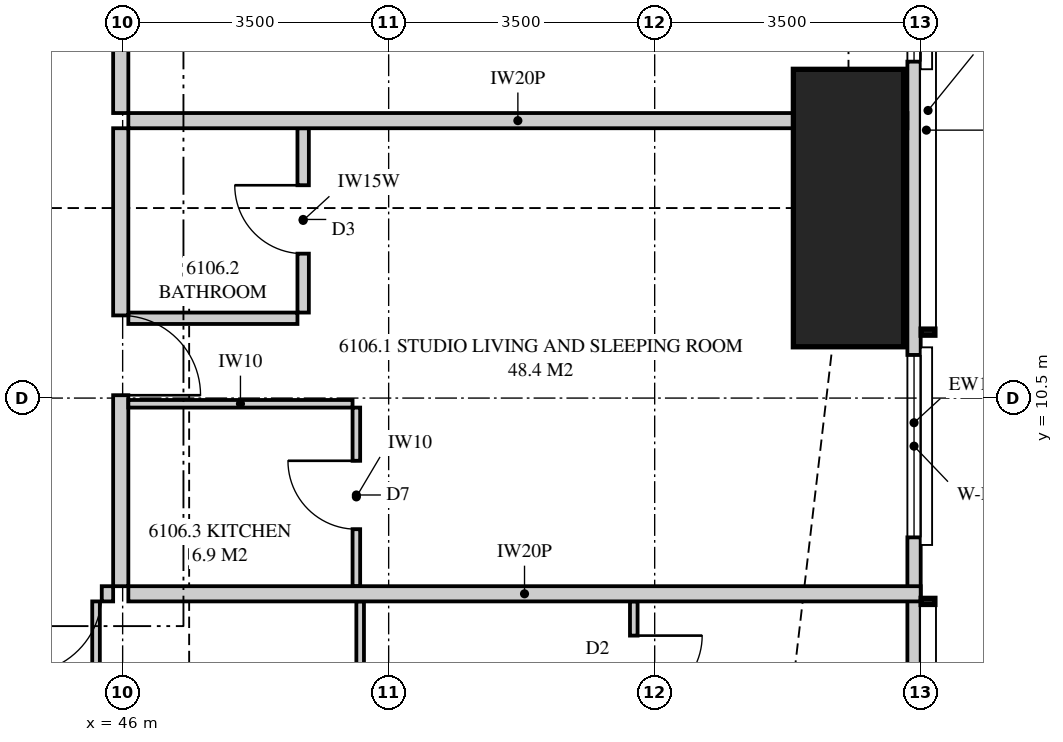
"""IFC4 building model, lengths in metres.
Left out: names, types, materials, properties, quantities, classifications, styles, units other than length and angle.
Written with IfcOpenShell. Run it as: python <this file> out.ifc"""

import sys

from ifc_helpers import new_model, si_unit, direction, frame, frame_2d, origin, origin_2d, place, context, subcontext, project, spatial, polyline, rectangle, outline, extrude, element, fill, save


model = new_model("IFC4")
c1 = context("Model", 3, precision=1e-05, world=origin(), true_north=direction((0.0, 1.0)))
c2 = subcontext(c1, "Body", "Model", "MODEL_VIEW")
j1 = project(units=[si_unit("LENGTHUNIT", "METRE"), si_unit("PLANEANGLEUNIT", "RADIAN")], contexts=[c1])
p1 = place(None, origin())
s1 = spatial("IfcSite", under=j1, at=p1, CompositionType="ELEMENT")
p2 = place(p1, origin())
s2 = spatial("IfcBuilding", under=s1, at=p2, CompositionType="ELEMENT")
p3 = place(p2, frame((0.0, 0.0, 224.95)))
s3 = spatial("IfcBuildingStorey", under=s2, at=p3, CompositionType="ELEMENT", Elevation=224.95)
p4 = place(p3, frame((55.55, 13.0, 0.0), z_axis=(0.0, 0.0, 1.0), x_axis=(1.0, 0.0, 0.0)))
e1 = element("IfcColumn", 1, at=p4, inside=s3, PredefinedType="COLUMN", context=c2, shape_type="SweptSolid", body=[
    extrude(rectangle(XDim=1.45, YDim=3.65, at=origin_2d()), origin(), (0.0, 0.0, 1.0), 3.5),
])
p5 = place(p3, frame((56.413, 3.051, 0.0), z_axis=(0.0, 0.0, 1.0), x_axis=(0.0, 1.0, 0.0)))
e2 = element("IfcWall", 2, at=p5, inside=s3, PredefinedType="SOLIDWALL", context=c2, shape_type="SweptSolid", body=[
    extrude(outline(polyline([(0.0, 0.0), (14.249, 0.0), (14.249, 2.3), (9.949, 2.3), (9.949, 3.26), (9.858, 3.26), (9.858, 2.3), (9.688, 2.3), (9.688, 3.26), (0.0, 3.26), (0.0, 0.0)])), frame((0.0, 0.087, 0.0), z_axis=(0.0, -1.0, 0.0), x_axis=(1.0, 0.0, 0.0)), (0.0, 0.0, 1.0), 0.175),
])
p6 = place(p5, frame((1.487, 0.0, 0.4)))
e3 = element("IfcOpeningElement", 3, at=p6, cuts=e2, PredefinedType="OPENING", context=c2, shape_type="SweptSolid", body=[
    extrude(rectangle(XDim=1.8, YDim=1.85, at=frame_2d((0.9, 0.925))), frame((0.0, 0.097, 0.0), z_axis=(0.0, -1.0, 0.0), x_axis=(1.0, 0.0, 0.0)), (0.0, 0.0, 1.0), 0.195),
])
p7 = place(p5, frame((5.616, 0.0, 0.4)))
e4 = element("IfcOpeningElement", 4, at=p7, cuts=e2, PredefinedType="OPENING", context=c2, shape_type="SweptSolid", body=[
    extrude(rectangle(XDim=2.4, YDim=1.85, at=frame_2d((1.2, 0.925))), frame((0.0, 0.097, 0.0), z_axis=(0.0, -1.0, 0.0), x_axis=(1.0, 0.0, 0.0)), (0.0, 0.0, 1.0), 0.195),
])
p8 = place(p5, frame((11.875, 0.0, 0.4)))
e5 = element("IfcOpeningElement", 5, at=p8, cuts=e2, PredefinedType="OPENING", context=c2, shape_type="SweptSolid", body=[
    extrude(rectangle(XDim=1.8, YDim=1.85, at=frame_2d((0.9, 0.925))), frame((0.0, 0.097, 0.0), z_axis=(0.0, -1.0, 0.0), x_axis=(1.0, 0.0, 0.0)), (0.0, 0.0, 1.0), 0.195),
])
p9 = place(p3, frame((38.55, 7.925, 0.0), z_axis=(0.0, 0.0, 1.0), x_axis=(1.0, 0.0, 0.0)))
e6 = element("IfcWall", 6, at=p9, inside=s3, PredefinedType="PARTITIONING", context=c2, shape_type="SweptSolid", body=[
    extrude(outline(polyline([(0.0, 0.0), (7.325, 0.0), (7.325, 3.26), (7.325, 2.66), (7.015, 2.66), (7.015, 3.26), (0.01, 3.26), (0.01, 2.66), (0.0, 2.66), (0.0, 3.26), (0.0, 0.0)])), frame((0.0, 0.1, 0.0), z_axis=(0.0, -1.0, 0.0), x_axis=(1.0, 0.0, 0.0)), (0.0, 0.0, 1.0), 0.2),
])
p10 = place(p9, frame((6.125, 0.0, 0.0)))
e7 = element("IfcOpeningElement", 7, at=p10, cuts=e6, PredefinedType="OPENING", context=c2, shape_type="SweptSolid", body=[
    extrude(rectangle(XDim=1.05, YDim=2.2, at=frame_2d((0.525, 1.1))), frame((0.0, 0.11, 0.0), z_axis=(0.0, -1.0, 0.0), x_axis=(1.0, 0.0, 0.0)), (0.0, 0.0, 1.0), 0.22),
])
p11 = place(p3, frame((45.65, 0.175, 0.0), z_axis=(0.0, 0.0, 1.0), x_axis=(0.0, 1.0, 0.0)))
e8 = element("IfcWall", 8, at=p11, inside=s3, PredefinedType="PARTITIONING", context=c2, shape_type="SweptSolid", body=[
    extrude(outline(polyline([(0.529, 2.3), (0.0, 2.3), (0.0, 0.0), (0.529, 0.0), (0.529, 0.252), (1.021, 0.252), (1.021, 0.0), (7.65, 0.0), (7.65, 2.66), (1.635, 2.66), (1.635, 2.3), (1.021, 2.3), (1.021, 2.048), (0.529, 2.048), (0.529, 2.3)])), frame((0.0, 0.05, 0.0), z_axis=(0.0, -1.0, 0.0), x_axis=(1.0, 0.0, 0.0)), (0.0, 0.0, 1.0), 0.1),
])
p12 = place(p11, frame((3.8, 0.0, 0.0)))
e9 = element("IfcOpeningElement", 9, at=p12, cuts=e8, PredefinedType="OPENING", context=c2, shape_type="SweptSolid", body=[
    extrude(rectangle(XDim=0.9, YDim=2.1, at=frame_2d((0.45, 1.05))), frame((0.0, 0.06, 0.0), z_axis=(0.0, -1.0, 0.0), x_axis=(1.0, 0.0, 0.0)), (0.0, 0.0, 1.0), 0.12),
])
p13 = place(p3, frame((52.725, 0.175, 0.0), z_axis=(0.0, 0.0, 1.0), x_axis=(0.0, 1.0, 0.0)))
e10 = element("IfcWall", 10, at=p13, inside=s3, PredefinedType="PARTITIONING", context=c2, shape_type="SweptSolid", body=[
    extrude(outline(polyline([(0.0, 0.0), (7.65, 0.0), (7.65, 3.26), (2.639, 3.26), (2.639, 2.3), (0.894, 2.3), (0.894, 3.26), (0.0, 3.26), (0.0, 0.0)])), frame((0.0, 0.05, 0.0), z_axis=(0.0, -1.0, 0.0), x_axis=(1.0, 0.0, 0.0)), (0.0, 0.0, 1.0), 0.1),
])
p14 = place(p13, frame((6.3, 0.0, 0.0)))
e11 = element("IfcOpeningElement", 11, at=p14, cuts=e10, PredefinedType="OPENING", context=c2, shape_type="SweptSolid", body=[
    extrude(rectangle(XDim=0.9, YDim=2.1, at=frame_2d((0.45, 1.05))), frame((0.0, 0.06, 0.0), z_axis=(0.0, -1.0, 0.0), x_axis=(1.0, 0.0, 0.0)), (0.0, 0.0, 1.0), 0.12),
])
p15 = place(p3, frame((49.125, 4.875, 0.0), z_axis=(0.0, 0.0, 1.0), x_axis=(0.0, 1.0, 0.0)))
e12 = element("IfcWall", 12, at=p15, inside=s3, PredefinedType="PARTITIONING", context=c2, shape_type="SweptSolid", body=[
    extrude(rectangle(XDim=2.95, YDim=0.1, at=frame_2d((1.475, 0.0))), origin(), (0.0, 0.0, 1.0), 3.26),
])
p16 = place(p3, frame((46.075, 7.925, 0.0), z_axis=(0.0, 0.0, 1.0), x_axis=(1.0, 0.0, 0.0)))
e13 = element("IfcWall", 13, at=p16, inside=s3, PredefinedType="PARTITIONING", context=c2, shape_type="SweptSolid", body=[
    extrude(outline(polyline([(0.0, 0.0), (10.425, 0.0), (10.425, 3.26), (9.8, 3.26), (9.8, 2.3), (7.968, 2.3), (7.968, 3.26), (2.11, 3.26), (2.11, 2.66), (0.0, 2.66), (0.0, 3.26), (0.0, 0.0)])), frame((0.0, 0.1, 0.0), z_axis=(0.0, -1.0, 0.0), x_axis=(1.0, 0.0, 0.0)), (0.0, 0.0, 1.0), 0.2),
])
p17 = place(p3, frame((56.325, 14.15, 0.0), z_axis=(0.0, 0.0, 1.0), x_axis=(-1.0, 0.0, 0.0)))
e14 = element("IfcWall", 14, at=p17, inside=s3, PredefinedType="PARTITIONING", context=c2, shape_type="SweptSolid", body=[
    extrude(outline(polyline([(0.529, 2.3), (0.0, 2.3), (0.0, 0.0), (0.529, 0.0), (0.529, 0.396), (1.021, 0.396), (1.021, 0.0), (10.25, 0.0), (10.25, 2.66), (1.685, 2.66), (1.685, 2.3), (1.021, 2.3), (1.021, 1.904), (0.529, 1.904), (0.529, 2.3)])), frame((0.0, 0.1, 0.0), z_axis=(0.0, -1.0, 0.0), x_axis=(1.0, 0.0, 0.0)), (0.0, 0.0, 1.0), 0.2),
])
p18 = place(p3, frame((45.975, 8.025, 0.0), z_axis=(0.0, 0.0, 1.0), x_axis=(0.0, 1.0, 0.0)))
e15 = element("IfcWall", 15, at=p18, inside=s3, PredefinedType="PARTITIONING", context=c2, shape_type="SweptSolid", body=[
    extrude(outline(polyline([(0.0, 0.0), (6.025, 0.0), (6.025, 3.26), (6.025, 2.66), (5.085, 2.66), (0.0, 2.66), (0.0, 3.26), (0.0, 0.0)])), frame((0.0, 0.1, 0.0), z_axis=(0.0, -1.0, 0.0), x_axis=(1.0, 0.0, 0.0)), (0.0, 0.0, 1.0), 0.2),
])
p19 = place(p18, frame((2.512, 0.0, 0.0)))
e16 = element("IfcOpeningElement", 16, at=p19, cuts=e15, PredefinedType="OPENING", context=c2, shape_type="SweptSolid", body=[
    extrude(rectangle(XDim=1.05, YDim=2.2, at=frame_2d((0.525, 1.1))), frame((0.0, 0.11, 0.0), z_axis=(0.0, -1.0, 0.0), x_axis=(1.0, 0.0, 0.0)), (0.0, 0.0, 1.0), 0.22),
])
p20 = place(p3, frame((48.375, 11.625, 0.0), z_axis=(0.0, 0.0, 1.0), x_axis=(0.0, 1.0, 0.0)))
e17 = element("IfcWall", 17, at=p20, inside=s3, PredefinedType="PLUMBINGWALL", context=c2, shape_type="SweptSolid", body=[
    extrude(outline(polyline([(0.0, 0.0), (2.425, 0.0), (2.425, 3.26), (2.425, 2.66), (0.09, 2.66), (0.09, 3.26), (0.0, 3.26), (0.0, 0.0)])), frame((0.0, 0.075, 0.0), z_axis=(0.0, -1.0, 0.0), x_axis=(1.0, 0.0, 0.0)), (0.0, 0.0, 1.0), 0.15),
])
p21 = place(p20, frame((0.775, 0.0, 0.0)))
e18 = element("IfcOpeningElement", 18, at=p21, cuts=e17, PredefinedType="OPENING", context=c2, shape_type="SweptSolid", body=[
    extrude(rectangle(XDim=0.9, YDim=2.1, at=frame_2d((0.45, 1.05))), frame((0.0, 0.085, 0.0), z_axis=(0.0, -1.0, 0.0), x_axis=(1.0, 0.0, 0.0)), (0.0, 0.0, 1.0), 0.17),
])
p22 = place(p3, frame((48.3, 11.55, 0.0), z_axis=(0.0, 0.0, 1.0), x_axis=(-1.0, 0.0, 0.0)))
e19 = element("IfcWall", 19, at=p22, inside=s3, PredefinedType="PLUMBINGWALL", context=c2, shape_type="SweptSolid", body=[
    extrude(outline(polyline([(0.0, 0.0), (2.225, 0.0), (2.225, 3.26), (2.225, 2.66), (0.14, 2.66), (0.14, 3.26), (0.0, 3.26), (0.0, 0.0)])), frame((0.0, 0.075, 0.0), z_axis=(0.0, -1.0, 0.0), x_axis=(1.0, 0.0, 0.0)), (0.0, 0.0, 1.0), 0.15),
])
p23 = place(p3, frame((49.075, 8.025, 0.0), z_axis=(0.0, 0.0, 1.0), x_axis=(0.0, 1.0, 0.0)))
e20 = element("IfcWall", 20, at=p23, inside=s3, PredefinedType="PARTITIONING", context=c2, shape_type="SweptSolid", body=[
    extrude(rectangle(XDim=2.35, YDim=0.1, at=frame_2d((1.175, 0.0))), origin(), (0.0, 0.0, 1.0), 3.26),
])
p24 = place(p23, frame((0.75, 0.0, 0.0)))
e21 = element("IfcOpeningElement", 21, at=p24, cuts=e20, PredefinedType="OPENING", context=c2, shape_type="SweptSolid", body=[
    extrude(rectangle(XDim=0.9, YDim=2.1, at=frame_2d((0.45, 1.05))), frame((0.0, 0.06, 0.0), z_axis=(0.0, -1.0, 0.0), x_axis=(1.0, 0.0, 0.0)), (0.0, 0.0, 1.0), 0.12),
])
p25 = place(p3, frame((49.025, 10.425, 0.0), z_axis=(0.0, 0.0, 1.0), x_axis=(-1.0, 0.0, 0.0)))
e22 = element("IfcWall", 22, at=p25, inside=s3, PredefinedType="PARTITIONING", context=c2, shape_type="SweptSolid", body=[
    extrude(outline(polyline([(0.0, 0.0), (2.95, 0.0), (2.95, 3.26), (2.95, 2.66), (0.89, 2.66), (0.89, 3.26), (0.0, 3.26), (0.0, 0.0)])), frame((0.0, 0.05, 0.0), z_axis=(0.0, -1.0, 0.0), x_axis=(1.0, 0.0, 0.0)), (0.0, 0.0, 1.0), 0.1),
])
p26 = place(p3, frame((45.975, 14.25, 0.0), z_axis=(0.0, 0.0, 1.0), x_axis=(0.0, 1.0, 0.0)))
e23 = element("IfcWall", 23, at=p26, inside=s3, PredefinedType="PARTITIONING", context=c2, shape_type="SweptSolid", body=[
    extrude(outline(polyline([(0.0, 0.0), (8.0, 0.0), (8.0, 3.26), (5.81, 3.26), (5.81, 2.66), (3.19, 2.66), (3.19, 3.26), (0.06, 3.26), (0.06, 2.66), (0.0, 2.66), (0.0, 3.26), (0.0, 0.0)])), frame((0.0, 0.1, 0.0), z_axis=(0.0, -1.0, 0.0), x_axis=(1.0, 0.0, 0.0)), (0.0, 0.0, 1.0), 0.2),
])
p27 = place(p26, frame((3.5, 0.0, 0.0)))
e24 = element("IfcOpeningElement", 24, at=p27, cuts=e23, PredefinedType="OPENING", context=c2, shape_type="SweptSolid", body=[
    extrude(rectangle(XDim=1.05, YDim=2.2, at=frame_2d((0.525, 1.1))), frame((0.0, 0.11, 0.0), z_axis=(0.0, -1.0, 0.0), x_axis=(1.0, 0.0, 0.0)), (0.0, 0.0, 1.0), 0.22),
])
p28 = place(p7, origin())
e25 = element("IfcWindow", 25, at=p28, inside=s3, PartitioningType="SINGLE_PANEL", PredefinedType="WINDOW", context=c2, shape_type="SweptSolid", body=[
    extrude(rectangle(XDim=2.4, YDim=1.85, at=frame_2d((1.2, 0.925))), frame((0.0, 0.03, 0.0), z_axis=(0.0, -1.0, 0.0), x_axis=(1.0, 0.0, 0.0)), (0.0, 0.0, 1.0), 0.06),
])
fill(e4, e25)
p29 = place(p8, origin())
e26 = element("IfcWindow", 26, at=p29, inside=s3, PartitioningType="SINGLE_PANEL", PredefinedType="WINDOW", context=c2, shape_type="SweptSolid", body=[
    extrude(rectangle(XDim=1.8, YDim=1.85, at=frame_2d((0.9, 0.925))), frame((0.0, 0.03, 0.0), z_axis=(0.0, -1.0, 0.0), x_axis=(1.0, 0.0, 0.0)), (0.0, 0.0, 1.0), 0.06),
])
fill(e5, e26)
p30 = place(p10, frame((1.05, 0.0, 0.0), z_axis=(0.0, 0.0, 1.0), x_axis=(-1.0, 0.0, 0.0)))
e27 = element("IfcDoor", 27, at=p30, inside=s3, OperationType="SINGLE_SWING_RIGHT", PredefinedType="DOOR", context=c2, shape_type="SweptSolid", body=[
    extrude(rectangle(XDim=1.05, YDim=2.2, at=frame_2d((0.525, 1.1))), frame((0.0, 0.025, 0.0), z_axis=(0.0, -1.0, 0.0), x_axis=(1.0, 0.0, 0.0)), (0.0, 0.0, 1.0), 0.05),
])
fill(e7, e27)
p31 = place(p14, frame((0.9, 0.0, 0.0), z_axis=(0.0, 0.0, 1.0), x_axis=(-1.0, 0.0, 0.0)))
e28 = element("IfcDoor", 28, at=p31, inside=s3, OperationType="SINGLE_SWING_LEFT", PredefinedType="DOOR", context=c2, shape_type="SweptSolid", body=[
    extrude(rectangle(XDim=0.9, YDim=2.1, at=frame_2d((0.45, 1.05))), frame((0.0, 0.025, 0.0), z_axis=(0.0, -1.0, 0.0), x_axis=(1.0, 0.0, 0.0)), (0.0, 0.0, 1.0), 0.05),
])
fill(e11, e28)
p32 = place(p19, frame((1.05, 0.0, 0.0), z_axis=(0.0, 0.0, 1.0), x_axis=(-1.0, 0.0, 0.0)))
e29 = element("IfcDoor", 29, at=p32, inside=s3, OperationType="SINGLE_SWING_RIGHT", PredefinedType="DOOR", context=c2, shape_type="SweptSolid", body=[
    extrude(rectangle(XDim=1.05, YDim=2.2, at=frame_2d((0.525, 1.1))), frame((0.0, 0.025, 0.0), z_axis=(0.0, -1.0, 0.0), x_axis=(1.0, 0.0, 0.0)), (0.0, 0.0, 1.0), 0.05),
])
fill(e16, e29)
p33 = place(p21, origin())
e30 = element("IfcDoor", 30, at=p33, inside=s3, OperationType="SINGLE_SWING_RIGHT", PredefinedType="DOOR", context=c2, shape_type="SweptSolid", body=[
    extrude(rectangle(XDim=0.9, YDim=2.1, at=frame_2d((0.45, 1.05))), frame((0.0, 0.025, 0.0), z_axis=(0.0, -1.0, 0.0), x_axis=(1.0, 0.0, 0.0)), (0.0, 0.0, 1.0), 0.05),
])
fill(e18, e30)
p34 = place(p24, origin())
e31 = element("IfcDoor", 31, at=p34, inside=s3, OperationType="SINGLE_SWING_RIGHT", PredefinedType="DOOR", context=c2, shape_type="SweptSolid", body=[
    extrude(rectangle(XDim=0.9, YDim=2.1, at=frame_2d((0.45, 1.05))), frame((0.0, 0.025, 0.0), z_axis=(0.0, -1.0, 0.0), x_axis=(1.0, 0.0, 0.0)), (0.0, 0.0, 1.0), 0.05),
])
fill(e21, e31)
save(model, sys.argv[1])
